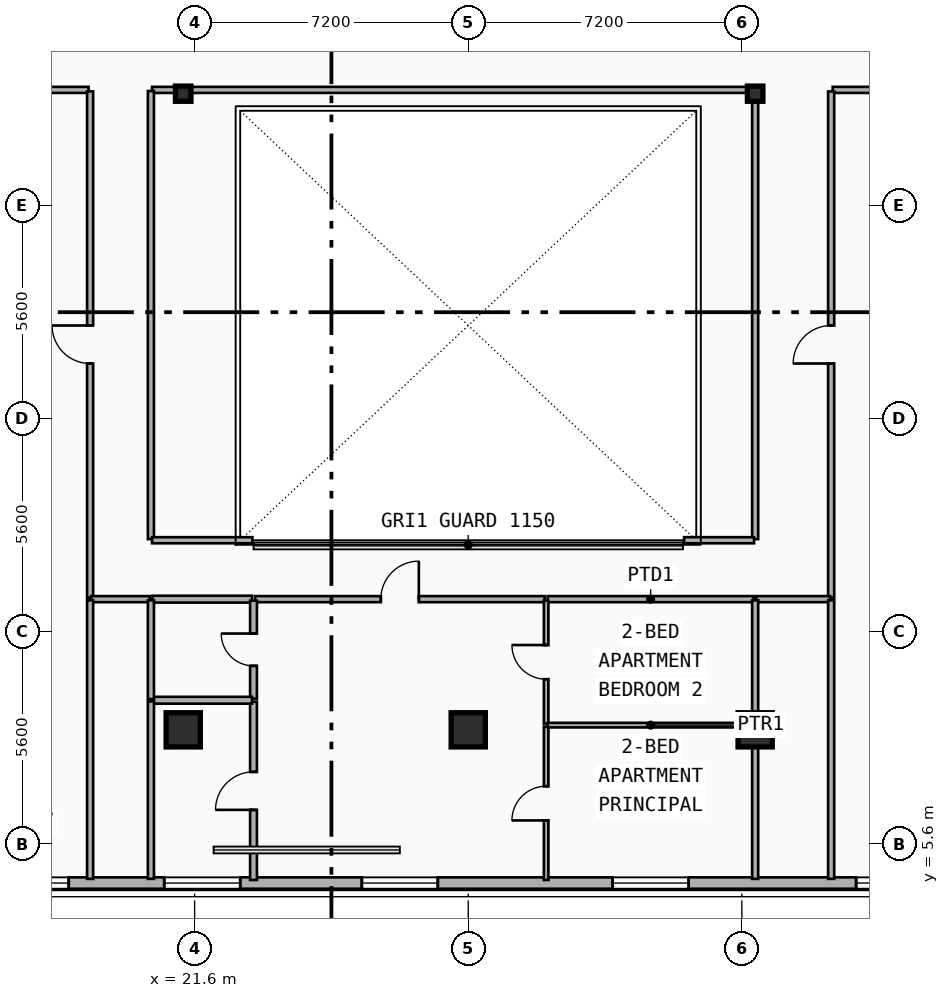
"""IFC4 building model, lengths in metres.
Left out: names, types, materials, properties, quantities, classifications, styles, units other than length and angle.
Written with IfcOpenShell. Run it as: python <this file> out.ifc"""

import sys

from ifc_helpers import new_model, si_unit, direction, frame, frame_2d, origin, origin_2d, place, context, subcontext, project, spatial, rectangle, i_section, extrude, element, fill, save


model = new_model("IFC4")
c1 = context("Model", 3, precision=1e-05, world=origin(), true_north=direction((0.0, 1.0)))
c2 = subcontext(c1, "Body", "Model", "MODEL_VIEW")
j1 = project(units=[si_unit("LENGTHUNIT", "METRE"), si_unit("PLANEANGLEUNIT", "RADIAN")], contexts=[c1])
p1 = place(None, origin())
s1 = spatial("IfcSite", under=j1, at=p1, CompositionType="ELEMENT")
p2 = place(p1, origin())
s2 = spatial("IfcBuilding", under=s1, at=p2, CompositionType="ELEMENT")
p3 = place(p2, frame((0.0, 0.0, 193.2)))
s3 = spatial("IfcBuildingStorey", under=s2, at=p3, CompositionType="ELEMENT", Elevation=193.2)
for number, where, z_axis, x_axis in (
    (1, (21.3, 25.35, 0.0), (0.0, 0.0, 1.0), (1.0, 0.0, 0.0)),
    (2, (36.35, 25.35, 0.0), (0.0, 0.0, 1.0), (1.0, 0.0, 0.0)),
):
    element("IfcColumn", number, at=place(p3, frame(where, z_axis=z_axis, x_axis=x_axis)), inside=s3, PredefinedType="COLUMN", context=c2, shape_type="SweptSolid", body=[
        extrude(i_section(OverallWidth=0.408, OverallDepth=0.4, WebThickness=0.025, FlangeThickness=0.039, FilletRadius=0.015, at=origin_2d()), origin(), (0.0, 0.0, 1.0), 3.6),
    ])
for number, where, z_axis, x_axis in (
    (3, (21.3, 8.72, 0.0), (0.0, -0.09, 0.996), (1.0, 0.0, 0.0)),
    (4, (28.8, 8.72, 0.0), (0.0, -0.09, 0.996), (1.0, 0.0, 0.0)),
    (5, (36.35, 8.72, 0.0), (0.0, -0.09, 0.996), (1.0, 0.0, 0.0)),
):
    element("IfcColumn", number, at=place(p3, frame(where, z_axis=z_axis, x_axis=x_axis)), inside=s3, PredefinedType="COLUMN", context=c2, shape_type="SweptSolid", body=[
        extrude(rectangle(XDim=0.9, YDim=0.9, at=origin_2d()), origin(), (0.0, 0.0, 1.0), 3.615),
    ])
p4 = place(p3, frame((48.0, 4.58, 0.0), z_axis=(0.0, 0.0, 1.0), x_axis=(-1.0, 0.0, 0.0)))
e6 = element("IfcWall", 6, at=p4, inside=s3, PredefinedType="SOLIDWALL", context=c2, shape_type="SweptSolid", body=[
    extrude(rectangle(XDim=38.4, YDim=0.3, at=frame_2d((19.2, 0.0))), origin(), (0.0, 0.0, 1.0), 3.34),
])
p5 = place(p4, frame((36.19, 0.0, 0.8)))
e7 = element("IfcOpeningElement", 7, at=p5, cuts=e6, PredefinedType="OPENING", context=c2, shape_type="SweptSolid", body=[
    extrude(rectangle(XDim=1.8, YDim=1.8, at=frame_2d((0.9, 0.9))), frame((0.0, 0.16, 0.0), z_axis=(0.0, -1.0, 0.0), x_axis=(1.0, 0.0, 0.0)), (0.0, 0.0, 1.0), 0.32),
])
p6 = place(p4, frame((29.712, 0.0, 0.7)))
e8 = element("IfcOpeningElement", 8, at=p6, cuts=e6, PredefinedType="OPENING", context=c2, shape_type="SweptSolid", body=[
    extrude(rectangle(XDim=2.0, YDim=2.2, at=frame_2d((1.0, 1.1))), frame((0.0, 0.16, 0.0), z_axis=(0.0, -1.0, 0.0), x_axis=(1.0, 0.0, 0.0)), (0.0, 0.0, 1.0), 0.32),
])
p7 = place(p4, frame((33.038, 0.0, 0.7)))
e9 = element("IfcOpeningElement", 9, at=p7, cuts=e6, PredefinedType="OPENING", context=c2, shape_type="SweptSolid", body=[
    extrude(rectangle(XDim=2.0, YDim=2.2, at=frame_2d((1.0, 1.1))), frame((0.0, 0.16, 0.0), z_axis=(0.0, -1.0, 0.0), x_axis=(1.0, 0.0, 0.0)), (0.0, 0.0, 1.0), 0.32),
])
p8 = place(p4, frame((20.0, 0.0, 0.7)))
e10 = element("IfcOpeningElement", 10, at=p8, cuts=e6, PredefinedType="OPENING", context=c2, shape_type="SweptSolid", body=[
    extrude(rectangle(XDim=2.0, YDim=2.2, at=frame_2d((1.0, 1.1))), frame((0.0, 0.16, 0.0), z_axis=(0.0, -1.0, 0.0), x_axis=(1.0, 0.0, 0.0)), (0.0, 0.0, 1.0), 0.32),
])
p9 = place(p4, frame((25.2, 0.0, 0.7)))
e11 = element("IfcOpeningElement", 11, at=p9, cuts=e6, PredefinedType="OPENING", context=c2, shape_type="SweptSolid", body=[
    extrude(rectangle(XDim=2.0, YDim=2.2, at=frame_2d((1.0, 1.1))), frame((0.0, 0.16, 0.0), z_axis=(0.0, -1.0, 0.0), x_axis=(1.0, 0.0, 0.0)), (0.0, 0.0, 1.0), 0.32),
])
p10 = place(p4, frame((13.4, 0.0, 0.7)))
e12 = element("IfcOpeningElement", 12, at=p10, cuts=e6, PredefinedType="OPENING", context=c2, shape_type="SweptSolid", body=[
    extrude(rectangle(XDim=2.0, YDim=2.2, at=frame_2d((1.0, 1.1))), frame((0.0, 0.16, 0.0), z_axis=(0.0, -1.0, 0.0), x_axis=(1.0, 0.0, 0.0)), (0.0, 0.0, 1.0), 0.32),
])
p11 = place(p4, frame((6.993, 0.0, 0.7)))
e13 = element("IfcOpeningElement", 13, at=p11, cuts=e6, PredefinedType="OPENING", context=c2, shape_type="SweptSolid", body=[
    extrude(rectangle(XDim=2.0, YDim=2.2, at=frame_2d((1.0, 1.1))), frame((0.0, 0.16, 0.0), z_axis=(0.0, -1.0, 0.0), x_axis=(1.0, 0.0, 0.0)), (0.0, 0.0, 1.0), 0.32),
])
p12 = place(p4, frame((3.469, 0.0, 0.7)))
e14 = element("IfcOpeningElement", 14, at=p12, cuts=e6, PredefinedType="OPENING", context=c2, shape_type="SweptSolid", body=[
    extrude(rectangle(XDim=2.0, YDim=2.2, at=frame_2d((1.0, 1.1))), frame((0.0, 0.16, 0.0), z_axis=(0.0, -1.0, 0.0), x_axis=(1.0, 0.0, 0.0)), (0.0, 0.0, 1.0), 0.32),
])
p13 = place(p4, frame((0.41, 0.0, 0.8)))
e15 = element("IfcOpeningElement", 15, at=p13, cuts=e6, PredefinedType="OPENING", context=c2, shape_type="SweptSolid", body=[
    extrude(rectangle(XDim=1.8, YDim=1.8, at=frame_2d((0.9, 0.9))), frame((0.0, 0.16, 0.0), z_axis=(0.0, -1.0, 0.0), x_axis=(1.0, 0.0, 0.0)), (0.0, 0.0, 1.0), 0.32),
])
p14 = place(p3, frame((15.765, 25.45, 0.0), z_axis=(0.0, 0.0, 1.0), x_axis=(1.0, 0.0, 0.0)))
e16 = element("IfcWall", 16, at=p14, inside=s3, PredefinedType="PARTITIONING", context=c2, shape_type="SweptSolid", body=[
    extrude(rectangle(XDim=3.045, YDim=0.16, at=frame_2d((1.522, 0.0))), origin(), (0.0, 0.0, 1.0), 3.34),
])
p15 = place(p14, frame((1.022, 0.0, 0.0)))
e17 = element("IfcOpeningElement", 17, at=p15, cuts=e16, PredefinedType="OPENING", context=c2, shape_type="SweptSolid", body=[
    extrude(rectangle(XDim=1.0, YDim=2.15, at=frame_2d((0.5, 1.075))), frame((0.0, 0.09, 0.0), z_axis=(0.0, -1.0, 0.0), x_axis=(1.0, 0.0, 0.0)), (0.0, 0.0, 1.0), 0.18),
])
p16 = place(p3, frame((38.39, 25.45, 0.0), z_axis=(0.0, 0.0, 1.0), x_axis=(1.0, 0.0, 0.0)))
e18 = element("IfcWall", 18, at=p16, inside=s3, PredefinedType="PARTITIONING", context=c2, shape_type="SweptSolid", body=[
    extrude(rectangle(XDim=3.233, YDim=0.16, at=frame_2d((1.617, 0.0))), origin(), (0.0, 0.0, 1.0), 3.34),
])
p17 = place(p16, frame((1.116, 0.0, 0.0)))
e19 = element("IfcOpeningElement", 19, at=p17, cuts=e18, PredefinedType="OPENING", context=c2, shape_type="SweptSolid", body=[
    extrude(rectangle(XDim=1.0, YDim=2.15, at=frame_2d((0.5, 1.075))), frame((0.0, 0.09, 0.0), z_axis=(0.0, -1.0, 0.0), x_axis=(1.0, 0.0, 0.0)), (0.0, 0.0, 1.0), 0.18),
])
p18 = place(p3, frame((18.85, 12.09, 0.0), z_axis=(0.0, 0.0, 1.0), x_axis=(0.0, 1.0, 0.0)))
e20 = element("IfcWall", 20, at=p18, inside=s3, PredefinedType="PARTITIONING", context=c2, shape_type="SweptSolid", body=[
    extrude(rectangle(XDim=13.32, YDim=0.16, at=frame_2d((6.66, 0.0))), origin(), (0.0, 0.0, 1.0), 2.87),
])
p19 = place(p18, frame((6.16, 0.0, 0.0)))
e21 = element("IfcOpeningElement", 21, at=p19, cuts=e20, PredefinedType="OPENING", context=c2, shape_type="SweptSolid", body=[
    extrude(rectangle(XDim=1.0, YDim=2.15, at=frame_2d((0.5, 1.075))), frame((0.0, 0.09, 0.0), z_axis=(0.0, -1.0, 0.0), x_axis=(1.0, 0.0, 0.0)), (0.0, 0.0, 1.0), 0.18),
])
p20 = place(p3, frame((38.35, 12.09, 0.0), z_axis=(0.0, 0.0, 1.0), x_axis=(0.0, 1.0, 0.0)))
e22 = element("IfcWall", 22, at=p20, inside=s3, PredefinedType="PARTITIONING", context=c2, shape_type="SweptSolid", body=[
    extrude(rectangle(XDim=13.32, YDim=0.16, at=frame_2d((6.66, 0.0))), origin(), (0.0, 0.0, 1.0), 2.87),
])
p21 = place(p20, frame((6.16, 0.0, 0.0)))
e23 = element("IfcOpeningElement", 23, at=p21, cuts=e22, PredefinedType="OPENING", context=c2, shape_type="SweptSolid", body=[
    extrude(rectangle(XDim=1.0, YDim=2.15, at=frame_2d((0.5, 1.075))), frame((0.0, 0.09, 0.0), z_axis=(0.0, -1.0, 0.0), x_axis=(1.0, 0.0, 0.0)), (0.0, 0.0, 1.0), 0.18),
])
p22 = place(p3, frame((23.19, 12.05, 0.0), z_axis=(0.0, 0.0, 1.0), x_axis=(1.0, 0.0, 0.0)))
e24 = element("IfcWall", 24, at=p22, inside=s3, PredefinedType="PARTITIONING", context=c2, shape_type="SweptSolid", body=[
    extrude(rectangle(XDim=7.62, YDim=0.16, at=frame_2d((3.81, 0.0))), origin(), (0.0, 0.0, 1.0), 2.42),
])
p23 = place(p22, frame((3.31, 0.0, 0.0)))
e25 = element("IfcOpeningElement", 25, at=p23, cuts=e24, PredefinedType="OPENING", context=c2, shape_type="SweptSolid", body=[
    extrude(rectangle(XDim=1.0, YDim=2.15, at=frame_2d((0.5, 1.075))), frame((0.0, 0.09, 0.0), z_axis=(0.0, -1.0, 0.0), x_axis=(1.0, 0.0, 0.0)), (0.0, 0.0, 1.0), 0.18),
])
p24 = place(p3, frame((20.49, 12.05, 0.0), z_axis=(0.0, 0.0, 1.0), x_axis=(1.0, 0.0, 0.0)))
e26 = element("IfcWall", 26, at=p24, inside=s3, PredefinedType="PLUMBINGWALL", context=c2, shape_type="SweptSolid", body=[
    extrude(rectangle(XDim=2.62, YDim=0.18, at=frame_2d((1.31, 0.0))), origin(), (0.0, 0.0, 1.0), 2.42),
])
p25 = place(p3, frame((30.89, 12.05, 0.0), z_axis=(0.0, 0.0, 1.0), x_axis=(1.0, 0.0, 0.0)))
e27 = element("IfcWall", 27, at=p25, inside=s3, PredefinedType="PARTITIONING", context=c2, shape_type="SweptSolid", body=[
    extrude(rectangle(XDim=5.42, YDim=0.16, at=frame_2d((2.71, 0.0))), origin(), (0.0, 0.0, 1.0), 2.42),
])
p26 = place(p3, frame((23.15, 4.66, 0.0), z_axis=(0.0, 0.0, 1.0), x_axis=(0.0, 1.0, 0.0)))
e28 = element("IfcWall", 28, at=p26, inside=s3, PredefinedType="PLUMBINGWALL", context=c2, shape_type="SweptSolid", body=[
    extrude(rectangle(XDim=4.69, YDim=0.18, at=frame_2d((2.345, 0.0))), origin(), (0.0, 0.0, 1.0), 3.0),
])
p27 = place(p26, frame((1.845, 0.0, 0.0)))
e29 = element("IfcOpeningElement", 29, at=p27, cuts=e28, PredefinedType="OPENING", context=c2, shape_type="SweptSolid", body=[
    extrude(rectangle(XDim=1.0, YDim=2.15, at=frame_2d((0.5, 1.075))), frame((0.0, 0.1, 0.0), z_axis=(0.0, -1.0, 0.0), x_axis=(1.0, 0.0, 0.0)), (0.0, 0.0, 1.0), 0.2),
])
p28 = place(p3, frame((23.15, 9.43, 0.0), z_axis=(0.0, 0.0, 1.0), x_axis=(0.0, 1.0, 0.0)))
e30 = element("IfcWall", 30, at=p28, inside=s3, PredefinedType="PLUMBINGWALL", context=c2, shape_type="SweptSolid", body=[
    extrude(rectangle(XDim=2.58, YDim=0.18, at=frame_2d((1.29, 0.0))), origin(), (0.0, 0.0, 1.0), 2.96),
])
p29 = place(p28, frame((0.865, 0.0, 0.0)))
e31 = element("IfcOpeningElement", 31, at=p29, cuts=e30, PredefinedType="OPENING", context=c2, shape_type="SweptSolid", body=[
    extrude(rectangle(XDim=0.85, YDim=2.1, at=frame_2d((0.425, 1.05))), frame((0.0, 0.1, 0.0), z_axis=(0.0, -1.0, 0.0), x_axis=(1.0, 0.0, 0.0)), (0.0, 0.0, 1.0), 0.2),
])
p30 = place(p3, frame((30.85, 4.66, 0.0), z_axis=(0.0, 0.0, 1.0), x_axis=(0.0, 1.0, 0.0)))
e32 = element("IfcWall", 32, at=p30, inside=s3, PredefinedType="PARTITIONING", context=c2, shape_type="SweptSolid", body=[
    extrude(rectangle(XDim=4.035, YDim=0.12, at=frame_2d((2.018, 0.0))), origin(), (0.0, 0.0, 1.0), 3.0),
])
p31 = place(p30, frame((1.567, 0.0, 0.0)))
e33 = element("IfcOpeningElement", 33, at=p31, cuts=e32, PredefinedType="OPENING", context=c2, shape_type="SweptSolid", body=[
    extrude(rectangle(XDim=0.9, YDim=2.1, at=frame_2d((0.45, 1.05))), frame((0.0, 0.07, 0.0), z_axis=(0.0, -1.0, 0.0), x_axis=(1.0, 0.0, 0.0)), (0.0, 0.0, 1.0), 0.14),
])
p32 = place(p3, frame((30.85, 8.775, 0.0), z_axis=(0.0, 0.0, 1.0), x_axis=(0.0, 1.0, 0.0)))
e34 = element("IfcWall", 34, at=p32, inside=s3, PredefinedType="PARTITIONING", context=c2, shape_type="SweptSolid", body=[
    extrude(rectangle(XDim=3.235, YDim=0.12, at=frame_2d((1.618, 0.0))), origin(), (0.0, 0.0, 1.0), 2.96),
])
p33 = place(p32, frame((1.167, 0.0, 0.0)))
e35 = element("IfcOpeningElement", 35, at=p33, cuts=e34, PredefinedType="OPENING", context=c2, shape_type="SweptSolid", body=[
    extrude(rectangle(XDim=0.9, YDim=2.1, at=frame_2d((0.45, 1.05))), frame((0.0, 0.07, 0.0), z_axis=(0.0, -1.0, 0.0), x_axis=(1.0, 0.0, 0.0)), (0.0, 0.0, 1.0), 0.14),
])
p34 = place(p3, frame((20.49, 9.39, 0.0), z_axis=(0.0, 0.0, 1.0), x_axis=(1.0, 0.0, 0.0)))
e36 = element("IfcWall", 36, at=p34, inside=s3, PredefinedType="PLUMBINGWALL", context=c2, shape_type="SweptSolid", body=[
    extrude(rectangle(XDim=2.62, YDim=0.18, at=frame_2d((1.31, 0.0))), origin(), (0.0, 0.0, 1.0), 2.42),
])
p35 = place(p3, frame((30.89, 8.735, 0.0), z_axis=(0.0, 0.0, 1.0), x_axis=(1.0, 0.0, 0.0)))
e37 = element("IfcWall", 37, at=p35, inside=s3, PredefinedType="PARTITIONING", context=c2, shape_type="SweptSolid", body=[
    extrude(rectangle(XDim=5.42, YDim=0.12, at=frame_2d((2.71, 0.0))), origin(), (0.0, 0.0, 1.0), 2.42),
])
p36 = place(p3, frame((20.48, 25.45, 0.0), z_axis=(0.0, 0.0, 1.0), x_axis=(1.0, 0.0, 0.0)))
e38 = element("IfcWall", 38, at=p36, inside=s3, PredefinedType="PARTITIONING", context=c2, shape_type="SweptSolid", body=[
    extrude(rectangle(XDim=15.84, YDim=0.16, at=frame_2d((7.92, 0.0))), origin(), (0.0, 0.0, 1.0), 2.42),
])
p37 = place(p3, frame((18.88, 12.05, 0.0), z_axis=(0.0, 0.0, 1.0), x_axis=(1.0, 0.0, 0.0)))
e39 = element("IfcWall", 39, at=p37, inside=s3, PredefinedType="PARTITIONING", context=c2, shape_type="SweptSolid", body=[
    extrude(rectangle(XDim=1.54, YDim=0.16, at=frame_2d((0.77, 0.0))), origin(), (0.0, 0.0, 1.0), 2.87),
])
p38 = place(p3, frame((20.45, 13.63, 0.0), z_axis=(0.0, 0.0, 1.0), x_axis=(0.0, 1.0, 0.0)))
e40 = element("IfcWall", 40, at=p38, inside=s3, PredefinedType="PARTITIONING", context=c2, shape_type="SweptSolid", body=[
    extrude(rectangle(XDim=11.79, YDim=0.16, at=frame_2d((5.895, 0.0))), origin(), (0.0, 0.0, 1.0), 2.87),
])
p39 = place(p3, frame((36.38, 12.05, 0.0), z_axis=(0.0, 0.0, 1.0), x_axis=(1.0, 0.0, 0.0)))
e41 = element("IfcWall", 41, at=p39, inside=s3, PredefinedType="PARTITIONING", context=c2, shape_type="SweptSolid", body=[
    extrude(rectangle(XDim=1.94, YDim=0.16, at=frame_2d((0.97, 0.0))), origin(), (0.0, 0.0, 1.0), 2.42),
])
p40 = place(p3, frame((36.35, 13.63, 0.0), z_axis=(0.0, 0.0, 1.0), x_axis=(0.0, 1.0, 0.0)))
e42 = element("IfcWall", 42, at=p40, inside=s3, PredefinedType="PARTITIONING", context=c2, shape_type="SweptSolid", body=[
    extrude(rectangle(XDim=11.79, YDim=0.16, at=frame_2d((5.895, 0.0))), origin(), (0.0, 0.0, 1.0), 2.42),
])
p41 = place(p3, frame((20.48, 13.6, 0.0), z_axis=(0.0, 0.0, 1.0), x_axis=(1.0, 0.0, 0.0)))
e43 = element("IfcWall", 43, at=p41, inside=s3, PredefinedType="PARTITIONING", context=c2, shape_type="SweptSolid", body=[
    extrude(rectangle(XDim=2.64, YDim=0.16, at=frame_2d((1.32, 0.0))), origin(), (0.0, 0.0, 1.0), 2.42),
])
p42 = place(p3, frame((34.48, 13.6, 0.0), z_axis=(0.0, 0.0, 1.0), x_axis=(1.0, 0.0, 0.0)))
e44 = element("IfcWall", 44, at=p42, inside=s3, PredefinedType="PARTITIONING", context=c2, shape_type="SweptSolid", body=[
    extrude(rectangle(XDim=1.84, YDim=0.16, at=frame_2d((0.92, 0.0))), origin(), (0.0, 0.0, 1.0), 2.42),
])
p43 = place(p3, frame((18.85, 4.69, 0.0), z_axis=(0.0, 0.0, 1.0), x_axis=(0.0, 1.0, 0.0)))
e45 = element("IfcWall", 45, at=p43, inside=s3, PredefinedType="PARTITIONING", context=c2, shape_type="SweptSolid", body=[
    extrude(rectangle(XDim=7.33, YDim=0.16, at=frame_2d((3.665, 0.0))), origin(), (0.0, 0.0, 1.0), 2.87),
])
p44 = place(p3, frame((20.45, 4.69, 0.0), z_axis=(0.0, 0.0, 1.0), x_axis=(0.0, 1.0, 0.0)))
e46 = element("IfcWall", 46, at=p44, inside=s3, PredefinedType="PARTITIONING", context=c2, shape_type="SweptSolid", body=[
    extrude(rectangle(XDim=4.67, YDim=0.16, at=frame_2d((2.335, 0.0))), origin(), (0.0, 0.0, 1.0), 3.0),
])
p45 = place(p3, frame((20.45, 9.42, 0.0), z_axis=(0.0, 0.0, 1.0), x_axis=(0.0, 1.0, 0.0)))
e47 = element("IfcWall", 47, at=p45, inside=s3, PredefinedType="PARTITIONING", context=c2, shape_type="SweptSolid", body=[
    extrude(rectangle(XDim=2.6, YDim=0.16, at=frame_2d((1.3, 0.0))), origin(), (0.0, 0.0, 1.0), 2.87),
])
p46 = place(p3, frame((36.35, 4.69, 0.0), z_axis=(0.0, 0.0, 1.0), x_axis=(0.0, 1.0, 0.0)))
e48 = element("IfcWall", 48, at=p46, inside=s3, PredefinedType="PARTITIONING", context=c2, shape_type="SweptSolid", body=[
    extrude(rectangle(XDim=4.015, YDim=0.16, at=frame_2d((2.008, 0.0))), origin(), (0.0, 0.0, 1.0), 2.42),
])
p47 = place(p3, frame((36.35, 8.765, 0.0), z_axis=(0.0, 0.0, 1.0), x_axis=(0.0, 1.0, 0.0)))
e49 = element("IfcWall", 49, at=p47, inside=s3, PredefinedType="PARTITIONING", context=c2, shape_type="SweptSolid", body=[
    extrude(rectangle(XDim=3.255, YDim=0.16, at=frame_2d((1.627, 0.0))), origin(), (0.0, 0.0, 1.0), 2.42),
])
p48 = place(p3, frame((38.35, 4.69, 0.0), z_axis=(0.0, 0.0, 1.0), x_axis=(0.0, 1.0, 0.0)))
e50 = element("IfcWall", 50, at=p48, inside=s3, PredefinedType="PARTITIONING", context=c2, shape_type="SweptSolid", body=[
    extrude(rectangle(XDim=7.33, YDim=0.16, at=frame_2d((3.665, 0.0))), origin(), (0.0, 0.0, 1.0), 2.87),
])
p49 = place(p6, origin())
e51 = element("IfcWindow", 51, at=p49, inside=s3, PartitioningType="SINGLE_PANEL", PredefinedType="WINDOW", context=c2, shape_type="SweptSolid", body=[
    extrude(rectangle(XDim=2.0, YDim=2.2, at=frame_2d((1.0, 1.1))), frame((0.0, 0.03, 0.0), z_axis=(0.0, -1.0, 0.0), x_axis=(1.0, 0.0, 0.0)), (0.0, 0.0, 1.0), 0.06),
])
fill(e8, e51)
p50 = place(p8, origin())
e52 = element("IfcWindow", 52, at=p50, inside=s3, PartitioningType="SINGLE_PANEL", PredefinedType="WINDOW", context=c2, shape_type="SweptSolid", body=[
    extrude(rectangle(XDim=2.0, YDim=2.2, at=frame_2d((1.0, 1.1))), frame((0.0, 0.03, 0.0), z_axis=(0.0, -1.0, 0.0), x_axis=(1.0, 0.0, 0.0)), (0.0, 0.0, 1.0), 0.06),
])
fill(e10, e52)
p51 = place(p9, origin())
e53 = element("IfcWindow", 53, at=p51, inside=s3, PartitioningType="SINGLE_PANEL", PredefinedType="WINDOW", context=c2, shape_type="SweptSolid", body=[
    extrude(rectangle(XDim=2.0, YDim=2.2, at=frame_2d((1.0, 1.1))), frame((0.0, 0.03, 0.0), z_axis=(0.0, -1.0, 0.0), x_axis=(1.0, 0.0, 0.0)), (0.0, 0.0, 1.0), 0.06),
])
fill(e11, e53)
p52 = place(p10, origin())
e54 = element("IfcWindow", 54, at=p52, inside=s3, PartitioningType="SINGLE_PANEL", PredefinedType="WINDOW", context=c2, shape_type="SweptSolid", body=[
    extrude(rectangle(XDim=2.0, YDim=2.2, at=frame_2d((1.0, 1.1))), frame((0.0, 0.03, 0.0), z_axis=(0.0, -1.0, 0.0), x_axis=(1.0, 0.0, 0.0)), (0.0, 0.0, 1.0), 0.06),
])
fill(e12, e54)
p53 = place(p11, origin())
e55 = element("IfcWindow", 55, at=p53, inside=s3, PartitioningType="SINGLE_PANEL", PredefinedType="WINDOW", context=c2, shape_type="SweptSolid", body=[
    extrude(rectangle(XDim=2.0, YDim=2.2, at=frame_2d((1.0, 1.1))), frame((0.0, 0.03, 0.0), z_axis=(0.0, -1.0, 0.0), x_axis=(1.0, 0.0, 0.0)), (0.0, 0.0, 1.0), 0.06),
])
fill(e13, e55)
p54 = place(p19, origin())
e56 = element("IfcDoor", 56, at=p54, inside=s3, OperationType="SINGLE_SWING_RIGHT", PredefinedType="DOOR", context=c2, shape_type="SweptSolid", body=[
    extrude(rectangle(XDim=1.0, YDim=2.15, at=frame_2d((0.5, 1.075))), frame((0.0, 0.025, 0.0), z_axis=(0.0, -1.0, 0.0), x_axis=(1.0, 0.0, 0.0)), (0.0, 0.0, 1.0), 0.05),
])
fill(e21, e56)
p55 = place(p21, origin())
e57 = element("IfcDoor", 57, at=p55, inside=s3, OperationType="SINGLE_SWING_LEFT", PredefinedType="DOOR", context=c2, shape_type="SweptSolid", body=[
    extrude(rectangle(XDim=1.0, YDim=2.15, at=frame_2d((0.5, 1.075))), frame((0.0, 0.025, 0.0), z_axis=(0.0, -1.0, 0.0), x_axis=(1.0, 0.0, 0.0)), (0.0, 0.0, 1.0), 0.05),
])
fill(e23, e57)
p56 = place(p23, origin())
e58 = element("IfcDoor", 58, at=p56, inside=s3, OperationType="SINGLE_SWING_RIGHT", PredefinedType="DOOR", context=c2, shape_type="SweptSolid", body=[
    extrude(rectangle(XDim=1.0, YDim=2.15, at=frame_2d((0.5, 1.075))), frame((0.0, 0.025, 0.0), z_axis=(0.0, -1.0, 0.0), x_axis=(1.0, 0.0, 0.0)), (0.0, 0.0, 1.0), 0.05),
])
fill(e25, e58)
p57 = place(p27, origin())
e59 = element("IfcDoor", 59, at=p57, inside=s3, OperationType="SINGLE_SWING_LEFT", PredefinedType="DOOR", context=c2, shape_type="SweptSolid", body=[
    extrude(rectangle(XDim=1.0, YDim=2.15, at=frame_2d((0.5, 1.075))), frame((0.0, 0.025, 0.0), z_axis=(0.0, -1.0, 0.0), x_axis=(1.0, 0.0, 0.0)), (0.0, 0.0, 1.0), 0.05),
])
fill(e29, e59)
p58 = place(p29, origin())
e60 = element("IfcDoor", 60, at=p58, inside=s3, OperationType="SINGLE_SWING_RIGHT", PredefinedType="DOOR", context=c2, shape_type="SweptSolid", body=[
    extrude(rectangle(XDim=0.85, YDim=2.1, at=frame_2d((0.425, 1.05))), frame((0.0, 0.025, 0.0), z_axis=(0.0, -1.0, 0.0), x_axis=(1.0, 0.0, 0.0)), (0.0, 0.0, 1.0), 0.05),
])
fill(e31, e60)
p59 = place(p31, origin())
e61 = element("IfcDoor", 61, at=p59, inside=s3, OperationType="SINGLE_SWING_LEFT", PredefinedType="DOOR", context=c2, shape_type="SweptSolid", body=[
    extrude(rectangle(XDim=0.9, YDim=2.1, at=frame_2d((0.45, 1.05))), frame((0.0, 0.025, 0.0), z_axis=(0.0, -1.0, 0.0), x_axis=(1.0, 0.0, 0.0)), (0.0, 0.0, 1.0), 0.05),
])
fill(e33, e61)
p60 = place(p33, origin())
e62 = element("IfcDoor", 62, at=p60, inside=s3, OperationType="SINGLE_SWING_RIGHT", PredefinedType="DOOR", context=c2, shape_type="SweptSolid", body=[
    extrude(rectangle(XDim=0.9, YDim=2.1, at=frame_2d((0.45, 1.05))), frame((0.0, 0.025, 0.0), z_axis=(0.0, -1.0, 0.0), x_axis=(1.0, 0.0, 0.0)), (0.0, 0.0, 1.0), 0.05),
])
fill(e35, e62)
save(model, sys.argv[1])
